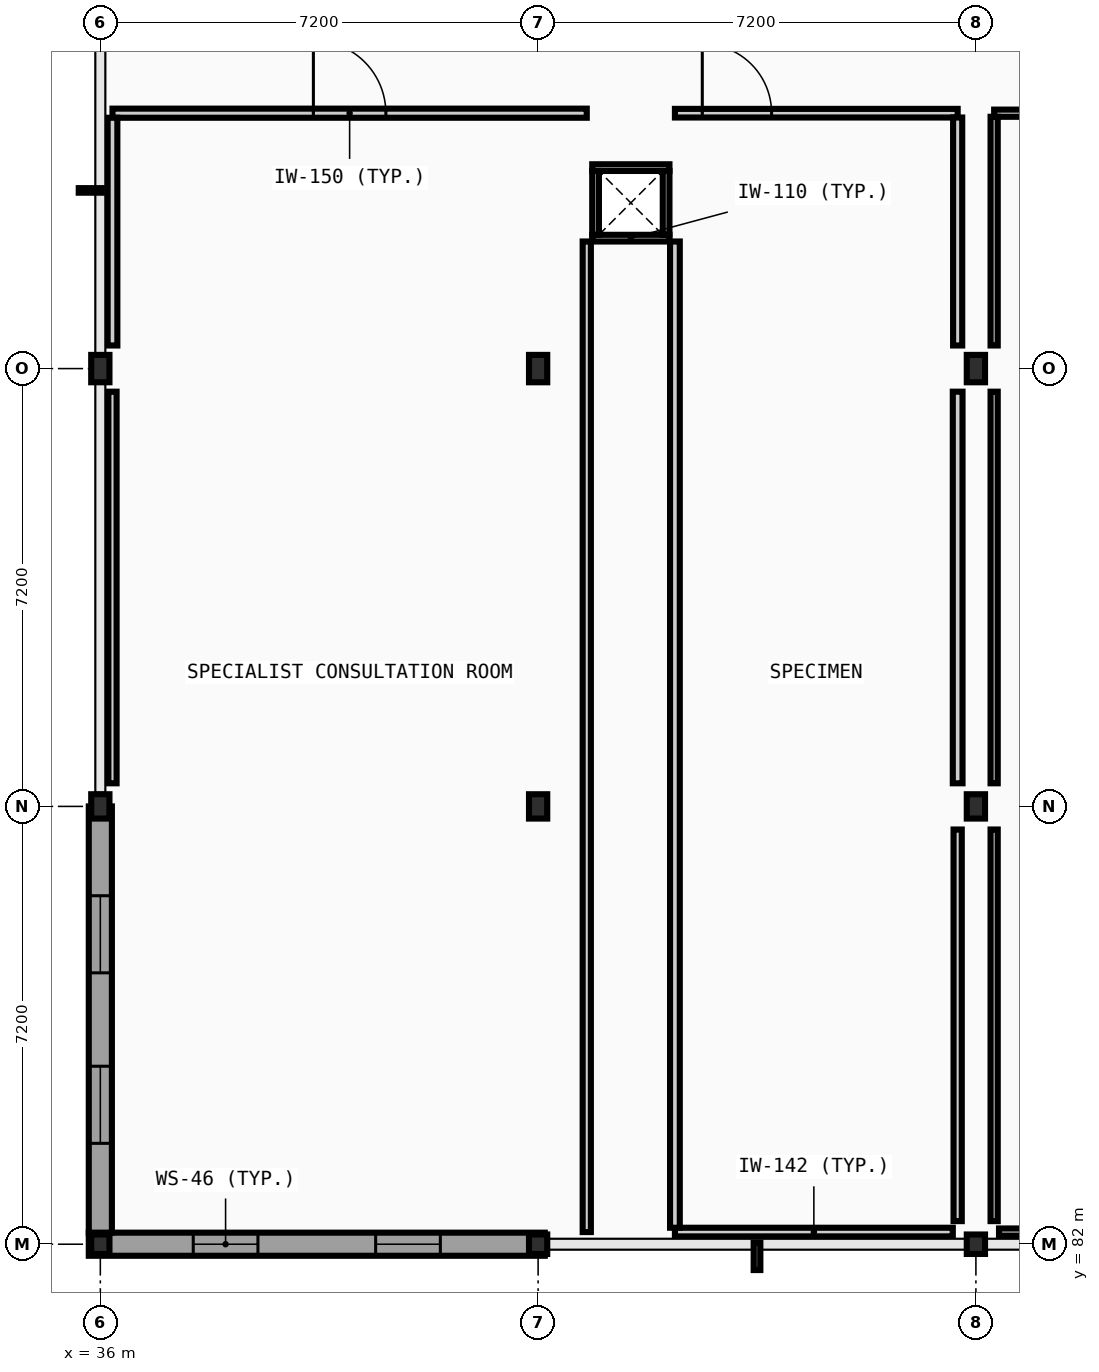
"""IFC4 building model, lengths in metres.
Left out: names, types, materials, properties, quantities, classifications, styles, units other than length and angle.
Written with IfcOpenShell. Run it as: python <this file> out.ifc"""

import sys

from ifc_helpers import new_model, si_unit, direction, frame, frame_2d, origin, origin_2d, place, context, subcontext, project, spatial, rectangle, i_section, extrude, element, fill, save


model = new_model("IFC4")
c1 = context("Model", 3, precision=1e-05, world=origin(), true_north=direction((0.0, 1.0)))
c2 = subcontext(c1, "Body", "Model", "MODEL_VIEW")
j1 = project(units=[si_unit("LENGTHUNIT", "METRE"), si_unit("PLANEANGLEUNIT", "RADIAN")], contexts=[c1])
p1 = place(None, origin())
s1 = spatial("IfcSite", under=j1, at=p1, CompositionType="ELEMENT")
p2 = place(p1, origin())
s2 = spatial("IfcBuilding", under=s1, at=p2, CompositionType="ELEMENT")
p3 = place(p2, frame((0.0, 0.0, 5.2)))
s3 = spatial("IfcBuildingStorey", under=s2, at=p3, CompositionType="ELEMENT", Elevation=5.2)
p4 = place(p3, frame((36.0, 82.0, 0.0), z_axis=(0.0, 0.0, 1.0), x_axis=(1.0, 0.0, 0.0)))
e1 = element("IfcColumn", 1, at=p4, inside=s3, PredefinedType="COLUMN", context=c2, shape_type="SweptSolid", body=[
    extrude(i_section(OverallWidth=0.3, OverallDepth=0.32, WebThickness=0.011, FlangeThickness=0.021, FilletRadius=0.027, at=origin_2d()), origin(), (0.0, 0.0, 1.0), 4.4),
])
p5 = place(p3, frame((36.0, 89.2, 0.0), z_axis=(0.0, 0.0, 1.0), x_axis=(1.0, 0.0, 0.0)))
e2 = element("IfcColumn", 2, at=p5, inside=s3, PredefinedType="COLUMN", context=c2, shape_type="SweptSolid", body=[
    extrude(i_section(OverallWidth=0.3, OverallDepth=0.4, WebThickness=0.013, FlangeThickness=0.024, FilletRadius=0.027, at=origin_2d()), origin(), (0.0, 0.0, 1.0), 4.4),
])
p6 = place(p3, frame((36.0, 96.4, 0.0), z_axis=(0.0, 0.0, 1.0), x_axis=(1.0, 0.0, 0.0)))
e3 = element("IfcColumn", 3, at=p6, inside=s3, PredefinedType="COLUMN", context=c2, shape_type="SweptSolid", body=[
    extrude(i_section(OverallWidth=0.3, OverallDepth=0.45, WebThickness=0.014, FlangeThickness=0.026, FilletRadius=0.027, at=origin_2d()), origin(), (0.0, 0.0, 1.0), 4.4),
])
p7 = place(p3, frame((43.2, 82.0, 0.0), z_axis=(0.0, 0.0, 1.0), x_axis=(1.0, 0.0, 0.0)))
e4 = element("IfcColumn", 4, at=p7, inside=s3, PredefinedType="COLUMN", context=c2, shape_type="SweptSolid", body=[
    extrude(i_section(OverallWidth=0.3, OverallDepth=0.32, WebThickness=0.011, FlangeThickness=0.021, FilletRadius=0.027, at=origin_2d()), origin(), (0.0, 0.0, 1.0), 4.4),
])
p8 = place(p3, frame((43.2, 89.2, 0.0), z_axis=(0.0, 0.0, 1.0), x_axis=(1.0, 0.0, 0.0)))
e5 = element("IfcColumn", 5, at=p8, inside=s3, PredefinedType="COLUMN", context=c2, shape_type="SweptSolid", body=[
    extrude(i_section(OverallWidth=0.3, OverallDepth=0.4, WebThickness=0.013, FlangeThickness=0.024, FilletRadius=0.027, at=origin_2d()), origin(), (0.0, 0.0, 1.0), 4.4),
])
p9 = place(p3, frame((43.2, 96.4, 0.0), z_axis=(0.0, 0.0, 1.0), x_axis=(1.0, 0.0, 0.0)))
e6 = element("IfcColumn", 6, at=p9, inside=s3, PredefinedType="COLUMN", context=c2, shape_type="SweptSolid", body=[
    extrude(i_section(OverallWidth=0.3, OverallDepth=0.45, WebThickness=0.014, FlangeThickness=0.026, FilletRadius=0.027, at=origin_2d()), origin(), (0.0, 0.0, 1.0), 4.4),
])
p10 = place(p3, frame((50.4, 82.0, 0.0), z_axis=(0.0, 0.0, 1.0), x_axis=(1.0, 0.0, 0.0)))
e7 = element("IfcColumn", 7, at=p10, inside=s3, PredefinedType="COLUMN", context=c2, shape_type="SweptSolid", body=[
    extrude(i_section(OverallWidth=0.3, OverallDepth=0.32, WebThickness=0.011, FlangeThickness=0.021, FilletRadius=0.027, at=origin_2d()), origin(), (0.0, 0.0, 1.0), 4.4),
])
p11 = place(p3, frame((50.4, 89.2, 0.0), z_axis=(0.0, 0.0, 1.0), x_axis=(1.0, 0.0, 0.0)))
e8 = element("IfcColumn", 8, at=p11, inside=s3, PredefinedType="COLUMN", context=c2, shape_type="SweptSolid", body=[
    extrude(i_section(OverallWidth=0.3, OverallDepth=0.4, WebThickness=0.013, FlangeThickness=0.024, FilletRadius=0.027, at=origin_2d()), origin(), (0.0, 0.0, 1.0), 4.4),
])
p12 = place(p3, frame((50.4, 96.4, 0.0), z_axis=(0.0, 0.0, 1.0), x_axis=(1.0, 0.0, 0.0)))
e9 = element("IfcColumn", 9, at=p12, inside=s3, PredefinedType="COLUMN", context=c2, shape_type="SweptSolid", body=[
    extrude(i_section(OverallWidth=0.3, OverallDepth=0.45, WebThickness=0.014, FlangeThickness=0.026, FilletRadius=0.027, at=origin_2d()), origin(), (0.0, 0.0, 1.0), 4.4),
])
p13 = place(p3, frame((35.81, 82.0, 0.0), z_axis=(0.0, 0.0, 1.0), x_axis=(1.0, 0.0, 0.0)))
e10 = element("IfcWall", 10, at=p13, inside=s3, PredefinedType="STANDARD", context=c2, shape_type="SweptSolid", body=[
    extrude(rectangle(XDim=7.5, YDim=0.38, at=frame_2d((3.75, 0.0))), origin(), (0.0, 0.0, 1.0), 3.88),
])
p14 = place(p13, frame((1.718, 0.0, 0.95)))
e11 = element("IfcOpeningElement", 11, at=p14, cuts=e10, PredefinedType="OPENING", context=c2, shape_type="SweptSolid", body=[
    extrude(rectangle(XDim=1.064, YDim=1.368, at=frame_2d((0.532, 0.684))), frame((0.0, 0.2, 0.0), z_axis=(0.0, -1.0, 0.0), x_axis=(1.0, 0.0, 0.0)), (0.0, 0.0, 1.0), 0.4),
])
p15 = place(p13, frame((4.718, 0.0, 0.95)))
e12 = element("IfcOpeningElement", 12, at=p15, cuts=e10, PredefinedType="OPENING", context=c2, shape_type="SweptSolid", body=[
    extrude(rectangle(XDim=1.064, YDim=1.368, at=frame_2d((0.532, 0.684))), frame((0.0, 0.2, 0.0), z_axis=(0.0, -1.0, 0.0), x_axis=(1.0, 0.0, 0.0)), (0.0, 0.0, 1.0), 0.4),
])
p16 = place(p3, frame((36.0, 89.2, 0.0), z_axis=(0.0, 0.0, 1.0), x_axis=(0.0, -1.0, 0.0)))
e13 = element("IfcWall", 13, at=p16, inside=s3, PredefinedType="STANDARD", context=c2, shape_type="SweptSolid", body=[
    extrude(rectangle(XDim=7.01, YDim=0.38, at=frame_2d((3.505, 0.0))), origin(), (0.0, 0.0, 1.0), 3.81),
])
p17 = place(p16, frame((1.469, 0.0, 0.95)))
e14 = element("IfcOpeningElement", 14, at=p17, cuts=e13, PredefinedType="OPENING", context=c2, shape_type="SweptSolid", body=[
    extrude(rectangle(XDim=1.268, YDim=1.368, at=frame_2d((0.634, 0.684))), frame((0.0, 0.2, 0.0), z_axis=(0.0, -1.0, 0.0), x_axis=(1.0, 0.0, 0.0)), (0.0, 0.0, 1.0), 0.4),
])
p18 = place(p16, frame((4.273, 0.0, 0.95)))
e15 = element("IfcOpeningElement", 15, at=p18, cuts=e13, PredefinedType="OPENING", context=c2, shape_type="SweptSolid", body=[
    extrude(rectangle(XDim=1.268, YDim=1.368, at=frame_2d((0.634, 0.684))), frame((0.0, 0.2, 0.0), z_axis=(0.0, -1.0, 0.0), x_axis=(1.0, 0.0, 0.0)), (0.0, 0.0, 1.0), 0.4),
])
for number, where, z_axis, x_axis in (
    (16, (44.09, 98.545, 0.0), (0.0, 0.0, 1.0), (1.0, 0.0, 0.0)),
    (17, (44.09, 99.705, 0.0), (0.0, 0.0, 1.0), (1.0, 0.0, 0.0)),
):
    element("IfcWall", number, at=place(p3, frame(where, z_axis=z_axis, x_axis=x_axis)), inside=s3, PredefinedType="PARTITIONING", context=c2, shape_type="SweptSolid", body=[
        extrude(rectangle(XDim=1.27, YDim=0.11, at=frame_2d((0.635, 0.0))), origin(), (0.0, 0.0, 1.0), 4.185),
    ])
for number, where, z_axis, x_axis in (
    (18, (44.145, 98.6, 0.0), (0.0, 0.0, 1.0), (0.0, 1.0, 0.0)),
    (19, (45.305, 98.6, 0.0), (0.0, 0.0, 1.0), (0.0, 1.0, 0.0)),
):
    element("IfcWall", number, at=place(p3, frame(where, z_axis=z_axis, x_axis=x_axis)), inside=s3, PredefinedType="PARTITIONING", context=c2, shape_type="SweptSolid", body=[
        extrude(rectangle(XDim=1.05, YDim=0.11, at=frame_2d((0.525, 0.0))), origin(), (0.0, 0.0, 1.0), 4.185),
    ])
p19 = place(p3, frame((45.45, 82.2, 0.0), z_axis=(0.0, 0.0, 1.0), x_axis=(1.0, 0.0, 0.0)))
e20 = element("IfcWall", 20, at=p19, inside=s3, PredefinedType="PARTITIONING", context=c2, shape_type="SweptSolid", body=[
    extrude(rectangle(XDim=4.57, YDim=0.142, at=frame_2d((2.285, 0.0))), origin(), (0.0, 0.0, 1.0), 3.88),
])
p20 = place(p3, frame((50.78, 82.2, 0.0), z_axis=(0.0, 0.0, 1.0), x_axis=(1.0, 0.0, 0.0)))
e21 = element("IfcWall", 21, at=p20, inside=s3, PredefinedType="PARTITIONING", context=c2, shape_type="SweptSolid", body=[
    extrude(rectangle(XDim=6.44, YDim=0.118, at=frame_2d((3.22, 0.0))), origin(), (0.0, 0.0, 1.0), 3.88),
])
p21 = place(p3, frame((36.2, 100.6, 0.0), z_axis=(0.0, 0.0, 1.0), x_axis=(1.0, 0.0, 0.0)))
e22 = element("IfcWall", 22, at=p21, inside=s3, PredefinedType="PARTITIONING", context=c2, shape_type="SweptSolid", body=[
    extrude(rectangle(XDim=7.8, YDim=0.15, at=frame_2d((3.9, 0.0))), origin(), (0.0, 0.0, 1.0), 4.185),
])
p22 = place(p21, frame((3.304, 0.0, 0.0)))
e23 = element("IfcOpeningElement", 23, at=p22, cuts=e22, PredefinedType="OPENING", context=c2, shape_type="SweptSolid", body=[
    extrude(rectangle(XDim=1.192, YDim=2.124, at=frame_2d((0.596, 1.062))), frame((0.0, 0.085, 0.0), z_axis=(0.0, -1.0, 0.0), x_axis=(1.0, 0.0, 0.0)), (0.0, 0.0, 1.0), 0.17),
])
p23 = place(p3, frame((45.45, 100.6, 0.0), z_axis=(0.0, 0.0, 1.0), x_axis=(1.0, 0.0, 0.0)))
e24 = element("IfcWall", 24, at=p23, inside=s3, PredefinedType="PARTITIONING", context=c2, shape_type="SweptSolid", body=[
    extrude(rectangle(XDim=4.65, YDim=0.142, at=frame_2d((2.325, 0.0))), origin(), (0.0, 0.0, 1.0), 4.185),
])
p24 = place(p23, frame((0.45, 0.0, 0.0)))
e25 = element("IfcOpeningElement", 25, at=p24, cuts=e24, PredefinedType="OPENING", context=c2, shape_type="SweptSolid", body=[
    extrude(rectangle(XDim=1.14, YDim=2.124, at=frame_2d((0.57, 1.062))), frame((0.0, 0.081, 0.0), z_axis=(0.0, -1.0, 0.0), x_axis=(1.0, 0.0, 0.0)), (0.0, 0.0, 1.0), 0.162),
])
p25 = place(p3, frame((50.7, 100.6, 0.0), z_axis=(0.0, 0.0, 1.0), x_axis=(1.0, 0.0, 0.0)))
e26 = element("IfcWall", 26, at=p25, inside=s3, PredefinedType="PARTITIONING", context=c2, shape_type="SweptSolid", body=[
    extrude(rectangle(XDim=13.9, YDim=0.118, at=frame_2d((6.95, 0.0))), origin(), (0.0, 0.0, 1.0), 4.185),
])
p26 = place(p25, frame((2.65, 0.0, 0.0)))
e27 = element("IfcOpeningElement", 27, at=p26, cuts=e26, PredefinedType="OPENING", context=c2, shape_type="SweptSolid", body=[
    extrude(rectangle(XDim=1.15, YDim=2.15, at=frame_2d((0.575, 1.075))), frame((0.0, 0.069, 0.0), z_axis=(0.0, -1.0, 0.0), x_axis=(1.0, 0.0, 0.0)), (0.0, 0.0, 1.0), 0.138),
])
p27 = place(p25, frame((9.592, 0.0, 0.0)))
e28 = element("IfcOpeningElement", 28, at=p27, cuts=e26, PredefinedType="OPENING", context=c2, shape_type="SweptSolid", body=[
    extrude(rectangle(XDim=1.166, YDim=2.124, at=frame_2d((0.583, 1.062))), frame((0.0, 0.069, 0.0), z_axis=(0.0, -1.0, 0.0), x_axis=(1.0, 0.0, 0.0)), (0.0, 0.0, 1.0), 0.138),
])
p28 = place(p3, frame((36.2, 89.58, 0.0), z_axis=(0.0, 0.0, 1.0), x_axis=(0.0, 1.0, 0.0)))
e29 = element("IfcWall", 29, at=p28, inside=s3, PredefinedType="PARTITIONING", context=c2, shape_type="SweptSolid", body=[
    extrude(rectangle(XDim=6.44, YDim=0.135, at=frame_2d((3.22, 0.0))), origin(), (0.0, 0.0, 1.0), 3.81),
])
p29 = place(p3, frame((36.2, 96.78, 0.0), z_axis=(0.0, 0.0, 1.0), x_axis=(0.0, 1.0, 0.0)))
e30 = element("IfcWall", 30, at=p29, inside=s3, PredefinedType="PARTITIONING", context=c2, shape_type="SweptSolid", body=[
    extrude(rectangle(XDim=3.745, YDim=0.16, at=frame_2d((1.873, 0.0))), origin(), (0.0, 0.0, 1.0), 3.81),
])
p30 = place(p3, frame((44.0, 82.2, 0.0), z_axis=(0.0, 0.0, 1.0), x_axis=(0.0, 1.0, 0.0)))
e31 = element("IfcWall", 31, at=p30, inside=s3, PredefinedType="PARTITIONING", context=c2, shape_type="SweptSolid", body=[
    extrude(rectangle(XDim=16.29, YDim=0.135, at=frame_2d((8.145, 0.0))), origin(), (0.0, 0.0, 1.0), 4.185),
])
p31 = place(p3, frame((45.45, 82.271, 0.0), z_axis=(0.0, 0.0, 1.0), x_axis=(0.0, 1.0, 0.0)))
e32 = element("IfcWall", 32, at=p31, inside=s3, PredefinedType="PARTITIONING", context=c2, shape_type="SweptSolid", body=[
    extrude(rectangle(XDim=16.219, YDim=0.16, at=frame_2d((8.109, 0.0))), origin(), (0.0, 0.0, 1.0), 3.9),
])
p32 = place(p3, frame((50.1, 82.38, 0.0), z_axis=(0.0, 0.0, 1.0), x_axis=(0.0, 1.0, 0.0)))
e33 = element("IfcWall", 33, at=p32, inside=s3, PredefinedType="PARTITIONING", context=c2, shape_type="SweptSolid", body=[
    extrude(rectangle(XDim=6.44, YDim=0.135, at=frame_2d((3.22, 0.0))), origin(), (0.0, 0.0, 1.0), 4.185),
])
p33 = place(p3, frame((50.1, 89.58, 0.0), z_axis=(0.0, 0.0, 1.0), x_axis=(0.0, 1.0, 0.0)))
e34 = element("IfcWall", 34, at=p33, inside=s3, PredefinedType="PARTITIONING", context=c2, shape_type="SweptSolid", body=[
    extrude(rectangle(XDim=6.44, YDim=0.16, at=frame_2d((3.22, 0.0))), origin(), (0.0, 0.0, 1.0), 3.88),
])
p34 = place(p3, frame((50.1, 96.78, 0.0), z_axis=(0.0, 0.0, 1.0), x_axis=(0.0, 1.0, 0.0)))
e35 = element("IfcWall", 35, at=p34, inside=s3, PredefinedType="PARTITIONING", context=c2, shape_type="SweptSolid", body=[
    extrude(rectangle(XDim=3.749, YDim=0.15, at=frame_2d((1.875, 0.0))), origin(), (0.0, 0.0, 1.0), 3.88),
])
p35 = place(p3, frame((50.7, 82.38, 0.0), z_axis=(0.0, 0.0, 1.0), x_axis=(0.0, 1.0, 0.0)))
e36 = element("IfcWall", 36, at=p35, inside=s3, PredefinedType="PARTITIONING", context=c2, shape_type="SweptSolid", body=[
    extrude(rectangle(XDim=6.44, YDim=0.118, at=frame_2d((3.22, 0.0))), origin(), (0.0, 0.0, 1.0), 4.185),
])
p36 = place(p3, frame((50.7, 89.58, 0.0), z_axis=(0.0, 0.0, 1.0), x_axis=(0.0, 1.0, 0.0)))
e37 = element("IfcWall", 37, at=p36, inside=s3, PredefinedType="PARTITIONING", context=c2, shape_type="SweptSolid", body=[
    extrude(rectangle(XDim=6.44, YDim=0.118, at=frame_2d((3.22, 0.0))), origin(), (0.0, 0.0, 1.0), 4.185),
])
p37 = place(p3, frame((50.7, 96.78, 0.0), z_axis=(0.0, 0.0, 1.0), x_axis=(0.0, 1.0, 0.0)))
e38 = element("IfcWall", 38, at=p37, inside=s3, PredefinedType="PARTITIONING", context=c2, shape_type="SweptSolid", body=[
    extrude(rectangle(XDim=3.761, YDim=0.118, at=frame_2d((1.88, 0.0))), origin(), (0.0, 0.0, 1.0), 4.185),
])
p38 = place(p14, origin())
e39 = element("IfcWindow", 39, at=p38, inside=s3, PartitioningType="SINGLE_PANEL", PredefinedType="WINDOW", context=c2, shape_type="SweptSolid", body=[
    extrude(rectangle(XDim=1.064, YDim=1.368, at=frame_2d((0.532, 0.684))), frame((0.0, 0.03, 0.0), z_axis=(0.0, -1.0, 0.0), x_axis=(1.0, 0.0, 0.0)), (0.0, 0.0, 1.0), 0.06),
])
fill(e11, e39)
p39 = place(p15, origin())
e40 = element("IfcWindow", 40, at=p39, inside=s3, PartitioningType="SINGLE_PANEL", PredefinedType="WINDOW", context=c2, shape_type="SweptSolid", body=[
    extrude(rectangle(XDim=1.064, YDim=1.368, at=frame_2d((0.532, 0.684))), frame((0.0, 0.03, 0.0), z_axis=(0.0, -1.0, 0.0), x_axis=(1.0, 0.0, 0.0)), (0.0, 0.0, 1.0), 0.06),
])
fill(e12, e40)
p40 = place(p17, origin())
e41 = element("IfcWindow", 41, at=p40, inside=s3, PartitioningType="SINGLE_PANEL", PredefinedType="WINDOW", context=c2, shape_type="SweptSolid", body=[
    extrude(rectangle(XDim=1.268, YDim=1.368, at=frame_2d((0.634, 0.684))), frame((0.0, 0.03, 0.0), z_axis=(0.0, -1.0, 0.0), x_axis=(1.0, 0.0, 0.0)), (0.0, 0.0, 1.0), 0.06),
])
fill(e14, e41)
p41 = place(p18, origin())
e42 = element("IfcWindow", 42, at=p41, inside=s3, PartitioningType="SINGLE_PANEL", PredefinedType="WINDOW", context=c2, shape_type="SweptSolid", body=[
    extrude(rectangle(XDim=1.268, YDim=1.368, at=frame_2d((0.634, 0.684))), frame((0.0, 0.03, 0.0), z_axis=(0.0, -1.0, 0.0), x_axis=(1.0, 0.0, 0.0)), (0.0, 0.0, 1.0), 0.06),
])
fill(e15, e42)
p42 = place(p24, origin())
e43 = element("IfcDoor", 43, at=p42, inside=s3, OperationType="SINGLE_SWING_LEFT", PredefinedType="DOOR", context=c2, shape_type="SweptSolid", body=[
    extrude(rectangle(XDim=1.14, YDim=2.124, at=frame_2d((0.57, 1.062))), frame((0.0, 0.025, 0.0), z_axis=(0.0, -1.0, 0.0), x_axis=(1.0, 0.0, 0.0)), (0.0, 0.0, 1.0), 0.05),
])
fill(e25, e43)
p43 = place(p22, origin())
e44 = element("IfcDoor", 44, at=p43, inside=s3, OperationType="SINGLE_SWING_LEFT", PredefinedType="DOOR", context=c2, shape_type="SweptSolid", body=[
    extrude(rectangle(XDim=1.192, YDim=2.124, at=frame_2d((0.596, 1.062))), frame((0.0, 0.025, 0.0), z_axis=(0.0, -1.0, 0.0), x_axis=(1.0, 0.0, 0.0)), (0.0, 0.0, 1.0), 0.05),
])
fill(e23, e44)
save(model, sys.argv[1])
